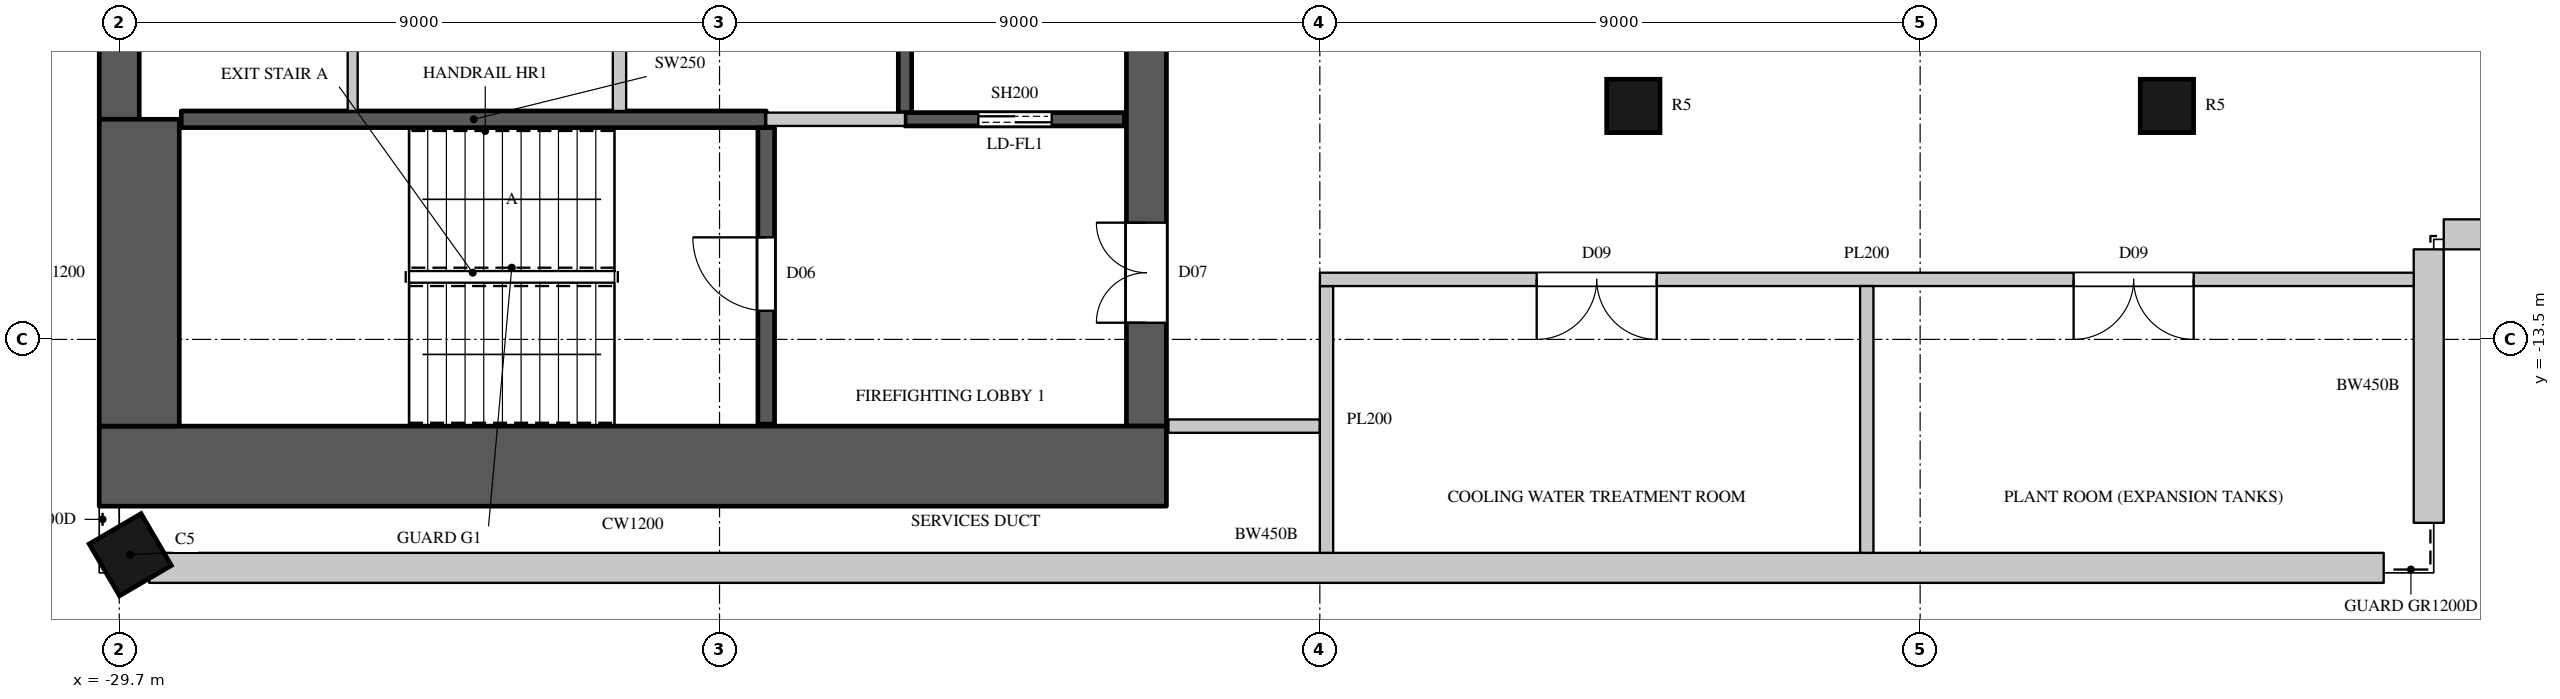
"""IFC4 building model, lengths in metres.
Left out: names, types, materials, properties, quantities, classifications, styles, units other than length and angle.
Written with IfcOpenShell. Run it as: python <this file> out.ifc"""

import sys

from ifc_helpers import new_model, si_unit, direction, frame, frame_2d, origin, origin_2d, place, context, subcontext, project, spatial, rectangle, circle, extrude, element, fill, save


model = new_model("IFC4")
c1 = context("Model", 3, precision=1e-05, world=origin(), true_north=direction((0.0, 1.0)))
c2 = subcontext(c1, "Body", "Model", "MODEL_VIEW")
j1 = project(units=[si_unit("LENGTHUNIT", "METRE"), si_unit("PLANEANGLEUNIT", "RADIAN")], contexts=[c1])
p1 = place(None, origin())
s1 = spatial("IfcSite", under=j1, at=p1, CompositionType="ELEMENT")
p2 = place(p1, origin())
s2 = spatial("IfcBuilding", under=s1, at=p2, CompositionType="ELEMENT")
p3 = place(p2, frame((0.0, 0.0, 339.0)))
s3 = spatial("IfcBuildingStorey", under=s2, at=p3, CompositionType="ELEMENT", Elevation=339.0)
p4 = place(p3, frame((-29.534, -16.728, 0.0), z_axis=(0.0, 0.0, 1.0), x_axis=(0.504399289829, -0.86347053014, 0.0)))
e1 = element("IfcColumn", 1, at=p4, inside=s3, PredefinedType="COLUMN", context=c2, shape_type="SweptSolid", body=[
    extrude(rectangle(XDim=0.9, YDim=0.9, at=origin_2d()), origin(), (0.0, 0.0, 1.0), 4.0),
])
for number, where, z_axis, x_axis in (
    (2, (-7.0, -10.0, 0.0), (0.0, 0.0, 1.0), (1.0, 0.0, 0.0)),
    (3, (1.0, -10.0, 0.0), (0.0, 0.0, 1.0), (1.0, 0.0, 0.0)),
):
    element("IfcColumn", number, at=place(p3, frame(where, z_axis=z_axis, x_axis=x_axis)), inside=s3, PredefinedType="COLUMN", context=c2, shape_type="SweptSolid", body=[
        extrude(circle(Radius=0.4, at=origin_2d()), origin(), (0.0, 0.0, 1.0), 4.0),
    ])
p5 = place(p3, frame((-29.25, -16.925, 0.0), z_axis=(0.0, 0.0, 1.0), x_axis=(1.0, 0.0, 0.0)))
e4 = element("IfcWall", 4, at=p5, inside=s3, PredefinedType="SOLIDWALL", context=c2, shape_type="SweptSolid", body=[
    extrude(rectangle(XDim=33.5, YDim=0.45, at=frame_2d((16.75, 0.0))), origin(), (0.0, 0.0, 1.0), 3.7),
])
for number, where, z_axis, x_axis in (
    (5, (4.925, -16.25, 0.0), (0.0, 0.0, 1.0), (0.0, 1.0, 0.0)),
    (6, (5.15, -11.925, 0.0), (0.0, 0.0, 1.0), (1.0, 0.0, 0.0)),
):
    element("IfcWall", number, at=place(p3, frame(where, z_axis=z_axis, x_axis=x_axis)), inside=s3, PredefinedType="SOLIDWALL", context=c2, shape_type="SweptSolid", body=[
        extrude(rectangle(XDim=4.1, YDim=0.45, at=frame_2d((2.05, 0.0))), origin(), (0.0, 0.0, 1.0), 3.7),
    ])
p6 = place(p3, frame((-30.0, -15.4, 0.0), z_axis=(0.0, 0.0, 1.0), x_axis=(1.0, 0.0, 0.0)))
e7 = element("IfcWall", 7, at=p6, inside=s3, PredefinedType="SHEAR", context=c2, shape_type="SweptSolid", body=[
    extrude(rectangle(XDim=16.0, YDim=1.2, at=frame_2d((8.0, 0.0))), origin(), (0.0, 0.0, 1.0), 4.0),
])
p7 = place(p3, frame((-14.3, -14.8, 0.0), z_axis=(0.0, 0.0, 1.0), x_axis=(0.0, 1.0, 0.0)))
e8 = element("IfcWall", 8, at=p7, inside=s3, PredefinedType="SHEAR", context=c2, shape_type="SweptSolid", body=[
    extrude(rectangle(XDim=29.6, YDim=0.6, at=frame_2d((14.8, 0.0))), origin(), (0.0, 0.0, 1.0), 4.0),
])
p8 = place(p7, frame((1.55, 0.0, 0.0)))
e9 = element("IfcOpeningElement", 9, at=p8, cuts=e8, PredefinedType="OPENING", context=c2, shape_type="SweptSolid", body=[
    extrude(rectangle(XDim=1.5, YDim=2.4, at=frame_2d((0.75, 1.2))), frame((0.0, 0.31, 0.0), z_axis=(0.0, -1.0, 0.0), x_axis=(1.0, 0.0, 0.0)), (0.0, 0.0, 1.0), 0.62),
])
p9 = place(p7, frame((26.55, 0.0, 0.0)))
e10 = element("IfcOpeningElement", 10, at=p9, cuts=e8, PredefinedType="OPENING", context=c2, shape_type="SweptSolid", body=[
    extrude(rectangle(XDim=1.5, YDim=2.4, at=frame_2d((0.75, 1.2))), frame((0.0, 0.31, 0.0), z_axis=(0.0, -1.0, 0.0), x_axis=(1.0, 0.0, 0.0)), (0.0, 0.0, 1.0), 0.62),
])
p10 = place(p7, frame((8.45, 0.0, 0.0)))
e11 = element("IfcOpeningElement", 11, at=p10, cuts=e8, PredefinedType="OPENING", context=c2, shape_type="SweptSolid", body=[
    extrude(rectangle(XDim=1.5, YDim=2.4, at=frame_2d((0.75, 1.2))), frame((0.0, 0.31, 0.0), z_axis=(0.0, -1.0, 0.0), x_axis=(1.0, 0.0, 0.0)), (0.0, 0.0, 1.0), 0.62),
])
p11 = place(p7, frame((19.65, 0.0, 0.0)))
e12 = element("IfcOpeningElement", 12, at=p11, cuts=e8, PredefinedType="OPENING", context=c2, shape_type="SweptSolid", body=[
    extrude(rectangle(XDim=1.5, YDim=2.4, at=frame_2d((0.75, 1.2))), frame((0.0, 0.31, 0.0), z_axis=(0.0, -1.0, 0.0), x_axis=(1.0, 0.0, 0.0)), (0.0, 0.0, 1.0), 0.62),
])
p12 = place(p7, frame((14.5, 0.0, 0.0)))
e13 = element("IfcOpeningElement", 13, at=p12, cuts=e8, PredefinedType="OPENING", context=c2, shape_type="SweptSolid", body=[
    extrude(rectangle(XDim=0.6, YDim=2.0, at=frame_2d((0.3, 1.0))), frame((0.0, 0.31, 0.0), z_axis=(0.0, -1.0, 0.0), x_axis=(1.0, 0.0, 0.0)), (0.0, 0.0, 1.0), 0.62),
])
p13 = place(p3, frame((-29.7, -10.2, 0.0), z_axis=(0.0, 0.0, 1.0), x_axis=(0.0, 1.0, 0.0)))
e14 = element("IfcWall", 14, at=p13, inside=s3, PredefinedType="SHEAR", context=c2, shape_type="SweptSolid", body=[
    extrude(rectangle(XDim=20.4, YDim=0.6, at=frame_2d((10.2, 0.0))), origin(), (0.0, 0.0, 1.0), 4.0),
])
p14 = place(p3, frame((-29.4, -14.8, 0.0), z_axis=(0.0, 0.0, 1.0), x_axis=(0.0, 1.0, 0.0)))
e15 = element("IfcWall", 15, at=p14, inside=s3, PredefinedType="SHEAR", context=c2, shape_type="SweptSolid", body=[
    extrude(rectangle(XDim=4.6, YDim=1.2, at=frame_2d((2.3, 0.0))), origin(), (0.0, 0.0, 1.0), 4.0),
])
p15 = place(p3, frame((-26.2, -10.075, 0.0), z_axis=(0.0, 0.0, 1.0), x_axis=(0.0, 1.0, 0.0)))
e16 = element("IfcWall", 16, at=p15, inside=s3, PredefinedType="PARTITIONING", context=c2, shape_type="SweptSolid", body=[
    extrude(rectangle(XDim=2.575, YDim=0.15, at=frame_2d((1.288, 0.0))), origin(), (0.0, 0.0, 1.0), 3.598),
])
p16 = place(p3, frame((-22.2, -10.075, 0.0), z_axis=(0.0, 0.0, 1.0), x_axis=(0.0, 1.0, 0.0)))
e17 = element("IfcWall", 17, at=p16, inside=s3, PredefinedType="PARTITIONING", context=c2, shape_type="SweptSolid", body=[
    extrude(rectangle(XDim=2.575, YDim=0.2, at=frame_2d((1.288, 0.0))), origin(), (0.0, 0.0, 1.0), 3.598),
])
p17 = place(p3, frame((-20.0, -10.2, 0.0), z_axis=(0.0, 0.0, 1.0), x_axis=(1.0, 0.0, 0.0)))
e18 = element("IfcWall", 18, at=p17, inside=s3, PredefinedType="PARTITIONING", context=c2, shape_type="SweptSolid", body=[
    extrude(rectangle(XDim=2.08, YDim=0.2, at=frame_2d((1.04, 0.0))), origin(), (0.0, 0.0, 1.0), 3.598),
])
p18 = place(p3, frame((-13.97, -14.8, 0.0), z_axis=(0.0, 0.0, 1.0), x_axis=(1.0, 0.0, 0.0)))
e19 = element("IfcWall", 19, at=p18, inside=s3, PredefinedType="PARTITIONING", context=c2, shape_type="SweptSolid", body=[
    extrude(rectangle(XDim=2.27, YDim=0.2, at=frame_2d((1.135, 0.0))), origin(), (0.0, 0.0, 1.0), 3.598),
])
p19 = place(p3, frame((-11.6, -16.7, 0.0), z_axis=(0.0, 0.0, 1.0), x_axis=(0.0, 1.0, 0.0)))
e20 = element("IfcWall", 20, at=p19, inside=s3, PredefinedType="PARTITIONING", context=c2, shape_type="SweptSolid", body=[
    extrude(rectangle(XDim=3.999, YDim=0.2, at=frame_2d((2.0, 0.0))), origin(), (0.0, 0.0, 1.0), 3.598),
])
p20 = place(p3, frame((-11.699, -12.6, 0.0), z_axis=(0.0, 0.0, 1.0), x_axis=(1.0, 0.0, 0.0)))
e21 = element("IfcWall", 21, at=p20, inside=s3, PredefinedType="PARTITIONING", context=c2, shape_type="SweptSolid", body=[
    extrude(rectangle(XDim=16.399, YDim=0.2, at=frame_2d((8.199, 0.0))), origin(), (0.0, 0.0, 1.0), 3.598),
])
p21 = place(p20, frame((3.25, 0.0, 0.0)))
e22 = element("IfcOpeningElement", 22, at=p21, cuts=e21, PredefinedType="OPENING", context=c2, shape_type="SweptSolid", body=[
    extrude(rectangle(XDim=1.8, YDim=2.4, at=frame_2d((0.9, 1.2))), frame((0.0, 0.11, 0.0), z_axis=(0.0, -1.0, 0.0), x_axis=(1.0, 0.0, 0.0)), (0.0, 0.0, 1.0), 0.22),
])
p22 = place(p20, frame((11.3, 0.0, 0.0)))
e23 = element("IfcOpeningElement", 23, at=p22, cuts=e21, PredefinedType="OPENING", context=c2, shape_type="SweptSolid", body=[
    extrude(rectangle(XDim=1.8, YDim=2.4, at=frame_2d((0.9, 1.2))), frame((0.0, 0.11, 0.0), z_axis=(0.0, -1.0, 0.0), x_axis=(1.0, 0.0, 0.0)), (0.0, 0.0, 1.0), 0.22),
])
p23 = place(p3, frame((-3.5, -16.7, 0.0), z_axis=(0.0, 0.0, 1.0), x_axis=(0.0, 1.0, 0.0)))
e24 = element("IfcWall", 24, at=p23, inside=s3, PredefinedType="PARTITIONING", context=c2, shape_type="SweptSolid", body=[
    extrude(rectangle(XDim=4.0, YDim=0.2, at=frame_2d((2.0, 0.0))), origin(), (0.0, 0.0, 1.0), 3.598),
])
p24 = place(p3, frame((-17.92, -10.1, 0.0), z_axis=(0.0, 0.0, 1.0), x_axis=(0.0, 1.0, 0.0)))
e25 = element("IfcWall", 25, at=p24, inside=s3, PredefinedType="SHEAR", context=c2, shape_type="SweptSolid", body=[
    extrude(rectangle(XDim=2.6, YDim=0.2, at=frame_2d((1.3, 0.0))), origin(), (0.0, 0.0, 1.0), 3.598),
])
p25 = place(p3, frame((-17.92, -10.2, 0.0), z_axis=(0.0, 0.0, 1.0), x_axis=(1.0, 0.0, 0.0)))
e26 = element("IfcWall", 26, at=p25, inside=s3, PredefinedType="SHEAR", context=c2, shape_type="SweptSolid", body=[
    extrude(rectangle(XDim=3.29, YDim=0.2, at=frame_2d((1.645, 0.0))), origin(), (0.0, 0.0, 1.0), 3.598),
])
p26 = place(p25, frame((1.1, 0.0, 0.0)))
e27 = element("IfcOpeningElement", 27, at=p26, cuts=e26, PredefinedType="OPENING", context=c2, shape_type="SweptSolid", body=[
    extrude(rectangle(XDim=1.1, YDim=2.2, at=frame_2d((0.55, 1.1))), frame((0.0, 0.11, 0.0), z_axis=(0.0, -1.0, 0.0), x_axis=(1.0, 0.0, 0.0)), (0.0, 0.0, 1.0), 0.22),
])
p27 = place(p3, frame((-28.77, -10.2, 0.0), z_axis=(0.0, 0.0, 1.0), x_axis=(1.0, 0.0, 0.0)))
e28 = element("IfcWall", 28, at=p27, inside=s3, PredefinedType="SHEAR", context=c2, shape_type="SweptSolid", body=[
    extrude(rectangle(XDim=8.77, YDim=0.25, at=frame_2d((4.385, 0.0))), origin(), (0.0, 0.0, 1.0), 3.598),
])
p28 = place(p3, frame((-20.0, -14.77, 0.0), z_axis=(0.0, 0.0, 1.0), x_axis=(0.0, 1.0, 0.0)))
e29 = element("IfcWall", 29, at=p28, inside=s3, PredefinedType="SHEAR", context=c2, shape_type="SweptSolid", body=[
    extrude(rectangle(XDim=4.445, YDim=0.25, at=frame_2d((2.223, 0.0))), origin(), (0.0, 0.0, 1.0), 3.598),
])
p29 = place(p28, frame((1.7, 0.0, 0.0)))
e30 = element("IfcOpeningElement", 30, at=p29, cuts=e29, PredefinedType="OPENING", context=c2, shape_type="SweptSolid", body=[
    extrude(rectangle(XDim=1.1, YDim=2.2, at=frame_2d((0.55, 1.1))), frame((0.0, 0.135, 0.0), z_axis=(0.0, -1.0, 0.0), x_axis=(1.0, 0.0, 0.0)), (0.0, 0.0, 1.0), 0.27),
])
p30 = place(p29, origin())
e31 = element("IfcDoor", 31, at=p30, inside=s3, OperationType="SINGLE_SWING_RIGHT", PredefinedType="DOOR", context=c2, shape_type="SweptSolid", body=[
    extrude(rectangle(XDim=1.1, YDim=2.2, at=frame_2d((0.55, 1.1))), frame((0.0, 0.025, 0.0), z_axis=(0.0, -1.0, 0.0), x_axis=(1.0, 0.0, 0.0)), (0.0, 0.0, 1.0), 0.05),
])
fill(e30, e31)
p31 = place(p26, origin())
e32 = element("IfcDoor", 32, at=p31, inside=s3, OperationType="DOUBLE_DOOR_SLIDING", PredefinedType="DOOR", context=c2, shape_type="SweptSolid", body=[
    extrude(rectangle(XDim=1.1, YDim=2.2, at=frame_2d((0.55, 1.1))), frame((0.0, 0.025, 0.0), z_axis=(0.0, -1.0, 0.0), x_axis=(1.0, 0.0, 0.0)), (0.0, 0.0, 1.0), 0.05),
])
fill(e27, e32)
p32 = place(p21, origin())
e33 = element("IfcDoor", 33, at=p32, inside=s3, OperationType="DOUBLE_DOOR_SINGLE_SWING", PredefinedType="DOOR", context=c2, shape_type="SweptSolid", body=[
    extrude(rectangle(XDim=1.8, YDim=2.4, at=frame_2d((0.9, 1.2))), frame((0.0, 0.025, 0.0), z_axis=(0.0, -1.0, 0.0), x_axis=(1.0, 0.0, 0.0)), (0.0, 0.0, 1.0), 0.05),
])
fill(e22, e33)
p33 = place(p22, origin())
e34 = element("IfcDoor", 34, at=p33, inside=s3, OperationType="DOUBLE_DOOR_SINGLE_SWING", PredefinedType="DOOR", context=c2, shape_type="SweptSolid", body=[
    extrude(rectangle(XDim=1.8, YDim=2.4, at=frame_2d((0.9, 1.2))), frame((0.0, 0.025, 0.0), z_axis=(0.0, -1.0, 0.0), x_axis=(1.0, 0.0, 0.0)), (0.0, 0.0, 1.0), 0.05),
])
fill(e23, e34)
p34 = place(p8, origin())
e35 = element("IfcDoor", 35, at=p34, inside=s3, OperationType="DOUBLE_DOOR_SINGLE_SWING", PredefinedType="DOOR", context=c2, shape_type="SweptSolid", body=[
    extrude(rectangle(XDim=1.5, YDim=2.4, at=frame_2d((0.75, 1.2))), frame((0.0, 0.295, 0.0), z_axis=(0.0, -1.0, 0.0), x_axis=(1.0, 0.0, 0.0)), (0.0, 0.0, 1.0), 0.05),
])
fill(e9, e35)
save(model, sys.argv[1])
